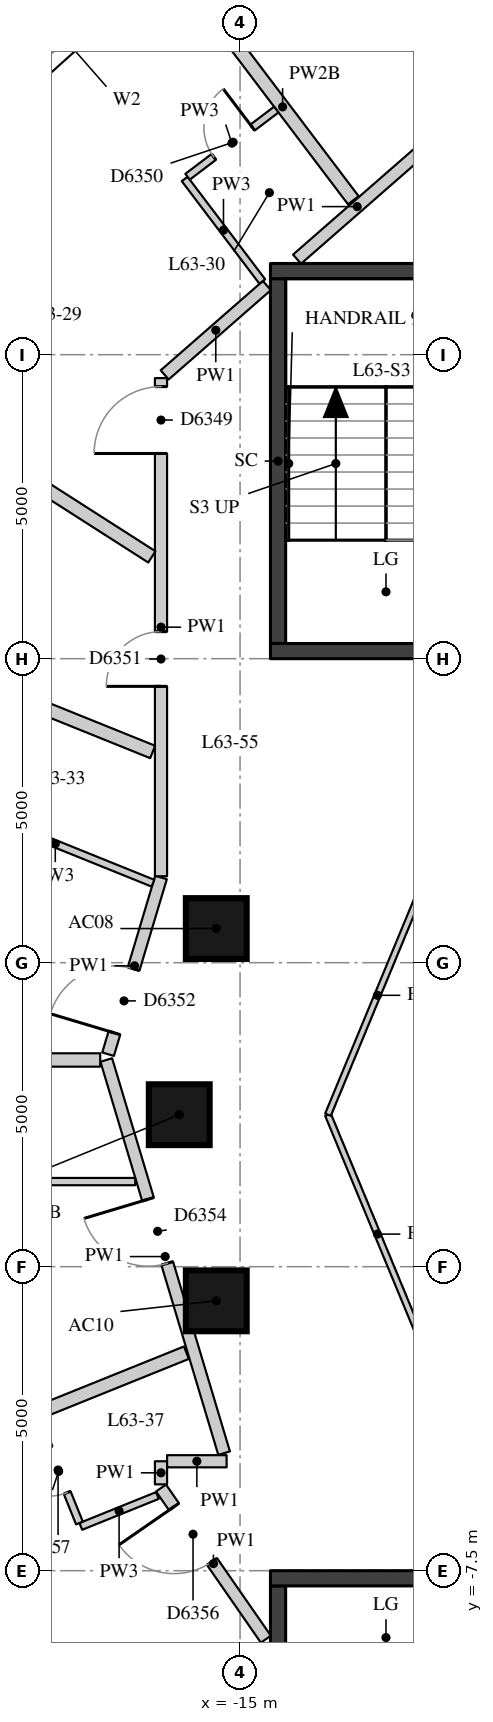
"""IFC4 building model, lengths in metres.
Left out: names, types, materials, properties, quantities, classifications, styles, units other than length and angle.
Written with IfcOpenShell. Run it as: python <this file> out.ifc"""

import sys

from ifc_helpers import new_model, si_unit, direction, frame, frame_2d, origin, origin_2d, place, context, subcontext, project, spatial, rectangle, extrude, element, fill, save


model = new_model("IFC4")
c1 = context("Model", 3, precision=1e-05, world=origin(), true_north=direction((0.0, 1.0)))
c2 = subcontext(c1, "Body", "Model", "MODEL_VIEW")
j1 = project(units=[si_unit("LENGTHUNIT", "METRE"), si_unit("PLANEANGLEUNIT", "RADIAN")], contexts=[c1])
p1 = place(None, origin())
s1 = spatial("IfcSite", under=j1, at=p1, CompositionType="ELEMENT")
p2 = place(p1, origin())
s2 = spatial("IfcBuilding", under=s1, at=p2, CompositionType="ELEMENT")
p3 = place(p2, frame((0.0, 0.0, 222.2)))
s3 = spatial("IfcBuildingStorey", under=s2, at=p3, CompositionType="ELEMENT", Elevation=222.2)
for number, where, z_axis, x_axis in (
    (1, (-15.391, 3.062, 0.0), (0.0, 0.0, 1.0), (1.0, 0.0, 0.0)),
    (2, (-16.0, 0.0, 0.0), (0.0, 0.0, 1.0), (1.0, 0.0, 0.0)),
    (3, (-15.391, -3.062, 0.0), (0.0, 0.0, 1.0), (1.0, 0.0, 0.0)),
):
    element("IfcColumn", number, at=place(p3, frame(where, z_axis=z_axis, x_axis=x_axis)), inside=s3, PredefinedType="COLUMN", context=c2, shape_type="SweptSolid", body=[
        extrude(rectangle(XDim=1.0, YDim=1.0, at=origin_2d()), origin(), (0.0, 0.0, 1.0), 3.3),
    ])
p4 = place(p3, frame((-16.553, 18.84, 0.0), z_axis=(0.0, 0.0, 1.0), x_axis=(-0.743442727602, -0.668799604348, 0.0)))
e4 = element("IfcWall", 4, at=p4, inside=s3, PredefinedType="SOLIDWALL", context=c2, shape_type="SweptSolid", body=[
    extrude(rectangle(XDim=3.513, YDim=0.45, at=frame_2d((1.756, 0.0))), origin(), (0.0, 0.0, 1.0), 3.02),
])
p5 = place(p4, frame((0.756, 0.0, 0.4)))
e5 = element("IfcOpeningElement", 5, at=p5, cuts=e4, PredefinedType="OPENING", context=c2, shape_type="SweptSolid", body=[
    extrude(rectangle(XDim=2.0, YDim=1.75, at=frame_2d((1.0, 0.875))), frame((0.0, 0.235, 0.0), z_axis=(0.0, -1.0, 0.0), x_axis=(1.0, 0.0, 0.0)), (0.0, 0.0, 1.0), 0.47),
])
p6 = place(p3, frame((-14.375, 7.75, -0.28), z_axis=(0.0, 0.0, 1.0), x_axis=(0.0, 1.0, 0.0)))
e6 = element("IfcWall", 6, at=p6, inside=s3, PredefinedType="SHEAR", context=c2, shape_type="SweptSolid", body=[
    extrude(rectangle(XDim=6.0, YDim=0.25, at=frame_2d((3.0, 0.0))), origin(), (0.0, 0.0, 1.0), 3.3),
])
for number, where, z_axis, x_axis in (
    (7, (-14.5, 13.875, -0.28), (0.0, 0.0, 1.0), (1.0, 0.0, 0.0)),
    (8, (-14.5, 7.625, -0.28), (0.0, 0.0, 1.0), (1.0, 0.0, 0.0)),
):
    element("IfcWall", number, at=place(p3, frame(where, z_axis=z_axis, x_axis=x_axis)), inside=s3, PredefinedType="SHEAR", context=c2, shape_type="SweptSolid", body=[
        extrude(rectangle(XDim=5.2, YDim=0.25, at=frame_2d((2.6, 0.0))), origin(), (0.0, 0.0, 1.0), 3.3),
    ])
p7 = place(p3, frame((-14.375, -13.75, -0.28), z_axis=(0.0, 0.0, 1.0), x_axis=(0.0, 1.0, 0.0)))
e9 = element("IfcWall", 9, at=p7, inside=s3, PredefinedType="SHEAR", context=c2, shape_type="SweptSolid", body=[
    extrude(rectangle(XDim=6.0, YDim=0.25, at=frame_2d((3.0, 0.0))), origin(), (0.0, 0.0, 1.0), 3.3),
])
p8 = place(p3, frame((-14.5, -7.625, -0.28), z_axis=(0.0, 0.0, 1.0), x_axis=(1.0, 0.0, 0.0)))
e10 = element("IfcWall", 10, at=p8, inside=s3, PredefinedType="SHEAR", context=c2, shape_type="SweptSolid", body=[
    extrude(rectangle(XDim=5.2, YDim=0.25, at=frame_2d((2.6, 0.0))), origin(), (0.0, 0.0, 1.0), 3.3),
])
p9 = place(p3, frame((-14.575, -8.627, 0.0), z_axis=(0.0, 0.0, 1.0), x_axis=(-0.569910381143, 0.821706856163, 0.0)))
e11 = element("IfcWall", 11, at=p9, inside=s3, PredefinedType="PARTITIONING", context=c2, shape_type="SweptSolid", body=[
    extrude(rectangle(XDim=3.026, YDim=0.2, at=frame_2d((1.513, 0.0))), origin(), (0.0, 0.0, 1.0), 3.02),
])
p10 = place(p9, frame((1.552, 0.0, 0.0)))
e12 = element("IfcOpeningElement", 12, at=p10, cuts=e11, PredefinedType="OPENING", context=c2, shape_type="SweptSolid", body=[
    extrude(rectangle(XDim=1.1, YDim=2.1, at=frame_2d((0.55, 1.05))), frame((0.0, 0.11, 0.0), z_axis=(0.0, -1.0, 0.0), x_axis=(1.0, 0.0, 0.0)), (0.0, 0.0, 1.0), 0.22),
])
p11 = place(p3, frame((-16.3, -6.08, 0.0), z_axis=(0.0, 0.0, 1.0), x_axis=(0.0, 1.0, 0.0)))
e13 = element("IfcWall", 13, at=p11, inside=s3, PredefinedType="PARTITIONING", context=c2, shape_type="SweptSolid", body=[
    extrude(rectangle(XDim=0.38, YDim=0.2, at=frame_2d((0.19, 0.0))), origin(), (0.0, 0.0, 1.0), 3.02),
])
p12 = place(p3, frame((-16.2, -5.7, 0.0), z_axis=(0.0, 0.0, 1.0), x_axis=(1.0, 0.0, 0.0)))
e14 = element("IfcWall", 14, at=p12, inside=s3, PredefinedType="PARTITIONING", context=c2, shape_type="SweptSolid", body=[
    extrude(rectangle(XDim=0.979, YDim=0.2, at=frame_2d((0.489, 0.0))), origin(), (0.0, 0.0, 1.0), 3.02),
])
p13 = place(p3, frame((-15.262, -5.567, 0.0), z_axis=(0.0, 0.0, 1.0), x_axis=(-0.28704593875, 0.957916817395, 0.0)))
e15 = element("IfcWall", 15, at=p13, inside=s3, PredefinedType="PARTITIONING", context=c2, shape_type="SweptSolid", body=[
    extrude(rectangle(XDim=6.751, YDim=0.2, at=frame_2d((3.375, 0.0))), origin(), (0.0, 0.0, 1.0), 3.02),
])
p14 = place(p13, frame((3.259, 0.0, 0.0)))
e16 = element("IfcOpeningElement", 16, at=p14, cuts=e15, PredefinedType="OPENING", context=c2, shape_type="SweptSolid", body=[
    extrude(rectangle(XDim=1.1, YDim=2.1, at=frame_2d((0.55, 1.05))), frame((0.0, 0.11, 0.0), z_axis=(0.0, -1.0, 0.0), x_axis=(1.0, 0.0, 0.0)), (0.0, 0.0, 1.0), 0.22),
])
p15 = place(p3, frame((-17.171, 0.995, 0.0), z_axis=(0.0, 0.0, 1.0), x_axis=(0.286919722033, 0.957954629984, 0.0)))
e17 = element("IfcWall", 17, at=p15, inside=s3, PredefinedType="PARTITIONING", context=c2, shape_type="SweptSolid", body=[
    extrude(rectangle(XDim=3.034, YDim=0.2, at=frame_2d((1.517, 0.0))), origin(), (0.0, 0.0, 1.0), 3.02),
])
p16 = place(p15, frame((0.365, 0.0, 0.0)))
e18 = element("IfcOpeningElement", 18, at=p16, cuts=e17, PredefinedType="OPENING", context=c2, shape_type="SweptSolid", body=[
    extrude(rectangle(XDim=1.1, YDim=2.1, at=frame_2d((0.55, 1.05))), frame((0.0, 0.11, 0.0), z_axis=(0.0, -1.0, 0.0), x_axis=(1.0, 0.0, 0.0)), (0.0, 0.0, 1.0), 0.22),
])
p17 = place(p3, frame((-16.3, 3.922, 0.0), z_axis=(0.0, 0.0, 1.0), x_axis=(0.0, 1.0, 0.0)))
e19 = element("IfcWall", 19, at=p17, inside=s3, PredefinedType="PARTITIONING", context=c2, shape_type="SweptSolid", body=[
    extrude(rectangle(XDim=8.193, YDim=0.2, at=frame_2d((4.097, 0.0))), origin(), (0.0, 0.0, 1.0), 3.02),
])
p18 = place(p17, frame((6.953, 0.0, 0.0)))
e20 = element("IfcOpeningElement", 20, at=p18, cuts=e19, PredefinedType="OPENING", context=c2, shape_type="SweptSolid", body=[
    extrude(rectangle(XDim=1.1, YDim=2.1, at=frame_2d((0.55, 1.05))), frame((0.0, 0.11, 0.0), z_axis=(0.0, -1.0, 0.0), x_axis=(1.0, 0.0, 0.0)), (0.0, 0.0, 1.0), 0.22),
])
p19 = place(p17, frame((3.123, 0.0, 0.0)))
e21 = element("IfcOpeningElement", 21, at=p19, cuts=e19, PredefinedType="OPENING", context=c2, shape_type="SweptSolid", body=[
    extrude(rectangle(XDim=0.9, YDim=2.1, at=frame_2d((0.45, 1.05))), frame((0.0, 0.11, 0.0), z_axis=(0.0, -1.0, 0.0), x_axis=(1.0, 0.0, 0.0)), (0.0, 0.0, 1.0), 0.22),
])
p20 = place(p3, frame((-16.24, 12.168, 0.0), z_axis=(0.0, 0.0, 1.0), x_axis=(0.752820521129, 0.658225844956, 0.0)))
e22 = element("IfcWall", 22, at=p20, inside=s3, PredefinedType="PARTITIONING", context=c2, shape_type="SweptSolid", body=[
    extrude(rectangle(XDim=2.232, YDim=0.2, at=frame_2d((1.116, 0.0))), origin(), (0.0, 0.0, 1.0), 3.02),
])
p21 = place(p3, frame((-14.063, 14.071, 0.0), z_axis=(0.0, 0.0, 1.0), x_axis=(0.752870230185, 0.6581689878, 0.0)))
e23 = element("IfcWall", 23, at=p21, inside=s3, PredefinedType="PARTITIONING", context=c2, shape_type="SweptSolid", body=[
    extrude(rectangle(XDim=2.627, YDim=0.2, at=frame_2d((1.313, 0.0))), origin(), (0.0, 0.0, 1.0), 3.02),
])
p22 = place(p3, frame((-15.463, 18.113, 0.0), z_axis=(0.0, 0.0, 1.0), x_axis=(0.603591792806, -0.79729351412, 0.0)))
e24 = element("IfcWall", 24, at=p22, inside=s3, PredefinedType="PARTITIONING", context=c2, shape_type="SweptSolid", body=[
    extrude(rectangle(XDim=3.854, YDim=0.22, at=frame_2d((1.927, 0.0))), origin(), (0.0, 0.0, 1.0), 2.57),
])
p23 = place(p3, frame((-21.055, 12.121, 0.0), z_axis=(0.0, 0.0, 1.0), x_axis=(0.842286811608, -0.539029616061, 0.0)))
e25 = element("IfcWall", 25, at=p23, inside=s3, PredefinedType="PARTITIONING", context=c2, shape_type="SweptSolid", body=[
    extrude(rectangle(XDim=5.466, YDim=0.22, at=frame_2d((2.733, 0.0))), origin(), (0.0, 0.0, 1.0), 3.02),
])
p24 = place(p3, frame((-22.896, 8.571, 0.0), z_axis=(0.0, 0.0, 1.0), x_axis=(0.927387137769, -0.374103056256, 0.0)))
e26 = element("IfcWall", 26, at=p24, inside=s3, PredefinedType="PARTITIONING", context=c2, shape_type="SweptSolid", body=[
    extrude(rectangle(XDim=6.964, YDim=0.22, at=frame_2d((3.482, 0.0))), origin(), (0.0, 0.0, 1.0), 3.02),
])
p25 = place(p3, frame((-24.4, 0.9, 0.0), z_axis=(0.0, 0.0, 1.0), x_axis=(1.0, 0.0, 0.0)))
e27 = element("IfcWall", 27, at=p25, inside=s3, PredefinedType="PARTITIONING", context=c2, shape_type="SweptSolid", body=[
    extrude(rectangle(XDim=7.1, YDim=0.22, at=frame_2d((3.55, 0.0))), origin(), (0.0, 0.0, 1.0), 2.47),
])
p26 = place(p3, frame((-21.651, -6.241, 0.0), z_axis=(0.0, 0.0, 1.0), x_axis=(0.927390089179, 0.37409573974, 0.0)))
e28 = element("IfcWall", 28, at=p26, inside=s3, PredefinedType="PARTITIONING", context=c2, shape_type="SweptSolid", body=[
    extrude(rectangle(XDim=6.221, YDim=0.22, at=frame_2d((3.11, 0.0))), origin(), (0.0, 0.0, 1.0), 3.02),
])
p27 = place(p3, frame((-14.634, 13.704, 0.0), z_axis=(0.0, 0.0, 1.0), x_axis=(-0.603613230526, 0.797277284221, 0.0)))
e29 = element("IfcWall", 29, at=p27, inside=s3, PredefinedType="PARTITIONING", context=c2, shape_type="SweptSolid", body=[
    extrude(rectangle(XDim=2.115, YDim=0.12, at=frame_2d((1.058, 0.0))), origin(), (0.0, 0.0, 1.0), 3.02),
])
p28 = place(p3, frame((-16.433, 3.808, 0.0), z_axis=(0.0, 0.0, 1.0), x_axis=(-0.927374031513, 0.374135544522, 0.0)))
e30 = element("IfcWall", 30, at=p28, inside=s3, PredefinedType="PARTITIONING", context=c2, shape_type="SweptSolid", body=[
    extrude(rectangle(XDim=3.464, YDim=0.12, at=frame_2d((1.732, 0.0))), origin(), (0.0, 0.0, 1.0), 3.02),
])
p29 = place(p3, frame((-16.725, -1.1, 0.0), z_axis=(0.0, 0.0, 1.0), x_axis=(-1.0, 0.0, 0.0)))
e31 = element("IfcWall", 31, at=p29, inside=s3, PredefinedType="PARTITIONING", context=c2, shape_type="SweptSolid", body=[
    extrude(rectangle(XDim=3.275, YDim=0.12, at=frame_2d((1.638, 0.0))), origin(), (0.0, 0.0, 1.0), 2.47),
])
p30 = place(p3, frame((-16.36, -6.264, 0.0), z_axis=(0.0, 0.0, 1.0), x_axis=(-0.927381089245, -0.374118049967, 0.0)))
e32 = element("IfcWall", 32, at=p30, inside=s3, PredefinedType="PARTITIONING", context=c2, shape_type="SweptSolid", body=[
    extrude(rectangle(XDim=1.357, YDim=0.12, at=frame_2d((0.679, 0.0))), origin(), (0.0, 0.0, 1.0), 3.02),
])
p31 = place(p3, frame((-15.863, 15.427, 0.0), z_axis=(0.0, 0.0, 1.0), x_axis=(0.79730226728, 0.603580230451, 0.0)))
e33 = element("IfcWall", 33, at=p31, inside=s3, PredefinedType="PARTITIONING", context=c2, shape_type="SweptSolid", body=[
    extrude(rectangle(XDim=1.83, YDim=0.12, at=frame_2d((0.915, 0.0))), origin(), (0.0, 0.0, 1.0), 3.02),
])
p32 = place(p31, frame((0.54, 0.0, 0.0)))
e34 = element("IfcOpeningElement", 34, at=p32, cuts=e33, PredefinedType="OPENING", context=c2, shape_type="SweptSolid", body=[
    extrude(rectangle(XDim=0.8, YDim=2.1, at=frame_2d((0.4, 1.05))), frame((0.0, 0.07, 0.0), z_axis=(0.0, -1.0, 0.0), x_axis=(1.0, 0.0, 0.0)), (0.0, 0.0, 1.0), 0.14),
])
p33 = place(p3, frame((-17.641, -6.716, 0.0), z_axis=(0.0, 0.0, 1.0), x_axis=(-0.374103450988, 0.927386978536, 0.0)))
e35 = element("IfcWall", 35, at=p33, inside=s3, PredefinedType="PARTITIONING", context=c2, shape_type="SweptSolid", body=[
    extrude(rectangle(XDim=1.83, YDim=0.12, at=frame_2d((0.915, 0.0))), origin(), (0.0, 0.0, 1.0), 3.02),
])
p34 = place(p33, frame((0.54, 0.0, 0.0)))
e36 = element("IfcOpeningElement", 36, at=p34, cuts=e35, PredefinedType="OPENING", context=c2, shape_type="SweptSolid", body=[
    extrude(rectangle(XDim=0.8, YDim=2.1, at=frame_2d((0.4, 1.05))), frame((0.0, 0.07, 0.0), z_axis=(0.0, -1.0, 0.0), x_axis=(1.0, 0.0, 0.0)), (0.0, 0.0, 1.0), 0.14),
])
for number, where, z_axis, x_axis in (
    (37, (-11.927, -3.927, 0.0), (0.0, 0.0, 1.0), (-0.383, 0.924, 0.0)),
    (38, (-13.554, 0.0, 0.0), (0.0, 0.0, 1.0), (0.383, 0.924, 0.0)),
):
    element("IfcWall", number, at=place(p3, frame(where, z_axis=z_axis, x_axis=x_axis)), inside=s3, PredefinedType="PARTITIONING", context=c2, shape_type="SweptSolid", body=[
        extrude(rectangle(XDim=4.251, YDim=0.1, at=frame_2d((2.125, 0.0))), origin(), (0.0, 0.0, 1.0), 3.02),
    ])
p35 = place(p5, origin())
e39 = element("IfcWindow", 39, at=p35, inside=s3, PartitioningType="SINGLE_PANEL", PredefinedType="WINDOW", context=c2, shape_type="SweptSolid", body=[
    extrude(rectangle(XDim=2.0, YDim=1.75, at=frame_2d((1.0, 0.875))), frame((0.0, 0.035, 0.0), z_axis=(0.0, -1.0, 0.0), x_axis=(1.0, 0.0, 0.0)), (0.0, 0.0, 1.0), 0.06),
])
fill(e5, e39)
p36 = place(p18, origin())
e40 = element("IfcDoor", 40, at=p36, inside=s3, OperationType="SINGLE_SWING_LEFT", PredefinedType="DOOR", context=c2, shape_type="SweptSolid", body=[
    extrude(rectangle(XDim=1.1, YDim=2.1, at=frame_2d((0.55, 1.05))), frame((0.0, 0.025, 0.0), z_axis=(0.0, -1.0, 0.0), x_axis=(1.0, 0.0, 0.0)), (0.0, 0.0, 1.0), 0.05),
])
fill(e20, e40)
p37 = place(p32, origin())
e41 = element("IfcDoor", 41, at=p37, inside=s3, OperationType="SINGLE_SWING_RIGHT", PredefinedType="DOOR", context=c2, shape_type="SweptSolid", body=[
    extrude(rectangle(XDim=0.8, YDim=2.1, at=frame_2d((0.4, 1.05))), frame((0.0, 0.025, 0.0), z_axis=(0.0, -1.0, 0.0), x_axis=(1.0, 0.0, 0.0)), (0.0, 0.0, 1.0), 0.05),
])
fill(e34, e41)
p38 = place(p19, origin())
e42 = element("IfcDoor", 42, at=p38, inside=s3, OperationType="SINGLE_SWING_LEFT", PredefinedType="DOOR", context=c2, shape_type="SweptSolid", body=[
    extrude(rectangle(XDim=0.9, YDim=2.1, at=frame_2d((0.45, 1.05))), frame((0.0, 0.025, 0.0), z_axis=(0.0, -1.0, 0.0), x_axis=(1.0, 0.0, 0.0)), (0.0, 0.0, 1.0), 0.05),
])
fill(e21, e42)
p39 = place(p16, origin())
e43 = element("IfcDoor", 43, at=p39, inside=s3, OperationType="SINGLE_SWING_LEFT", PredefinedType="DOOR", context=c2, shape_type="SweptSolid", body=[
    extrude(rectangle(XDim=1.1, YDim=2.1, at=frame_2d((0.55, 1.05))), frame((0.0, 0.025, 0.0), z_axis=(0.0, -1.0, 0.0), x_axis=(1.0, 0.0, 0.0)), (0.0, 0.0, 1.0), 0.05),
])
fill(e18, e43)
p40 = place(p14, origin())
e44 = element("IfcDoor", 44, at=p40, inside=s3, OperationType="SINGLE_SWING_RIGHT", PredefinedType="DOOR", context=c2, shape_type="SweptSolid", body=[
    extrude(rectangle(XDim=1.1, YDim=2.1, at=frame_2d((0.55, 1.05))), frame((0.0, 0.025, 0.0), z_axis=(0.0, -1.0, 0.0), x_axis=(1.0, 0.0, 0.0)), (0.0, 0.0, 1.0), 0.05),
])
fill(e16, e44)
p41 = place(p10, origin())
e45 = element("IfcDoor", 45, at=p41, inside=s3, OperationType="SINGLE_SWING_RIGHT", PredefinedType="DOOR", context=c2, shape_type="SweptSolid", body=[
    extrude(rectangle(XDim=1.1, YDim=2.1, at=frame_2d((0.55, 1.05))), frame((0.0, 0.025, 0.0), z_axis=(0.0, -1.0, 0.0), x_axis=(1.0, 0.0, 0.0)), (0.0, 0.0, 1.0), 0.05),
])
fill(e12, e45)
p42 = place(p34, origin())
e46 = element("IfcDoor", 46, at=p42, inside=s3, OperationType="SINGLE_SWING_RIGHT", PredefinedType="DOOR", context=c2, shape_type="SweptSolid", body=[
    extrude(rectangle(XDim=0.8, YDim=2.1, at=frame_2d((0.4, 1.05))), frame((0.0, 0.025, 0.0), z_axis=(0.0, -1.0, 0.0), x_axis=(1.0, 0.0, 0.0)), (0.0, 0.0, 1.0), 0.05),
])
fill(e36, e46)
save(model, sys.argv[1])
